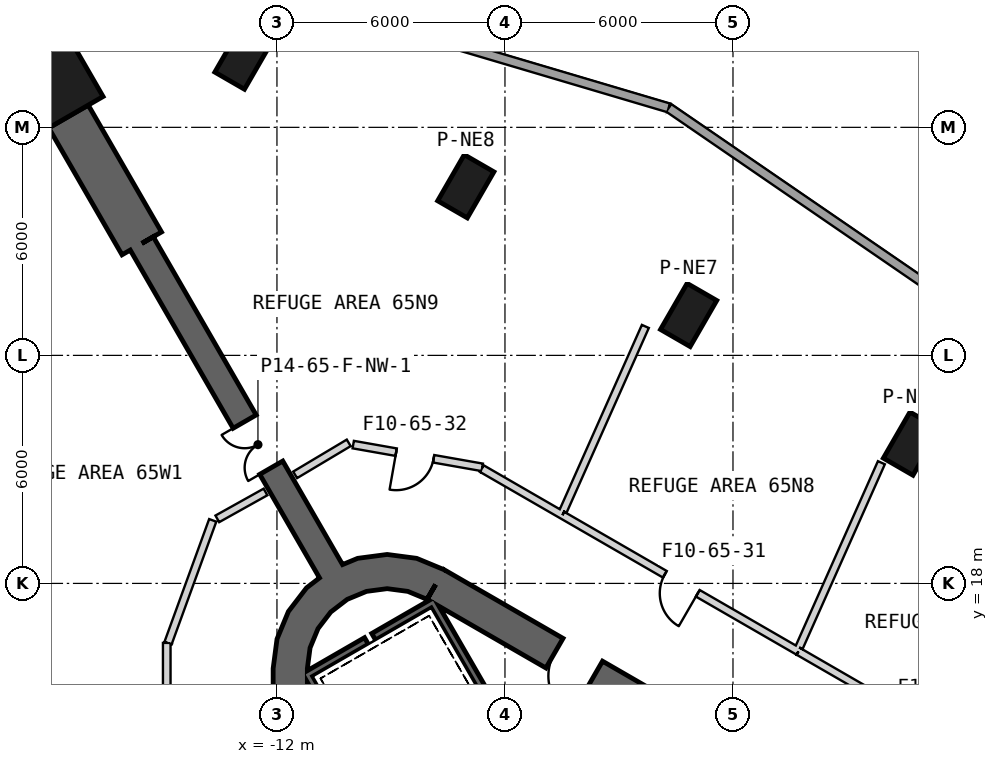
"""IFC4 building model, lengths in metres.
Left out: names, types, materials, properties, quantities, classifications, styles, units other than length and angle.
Written with IfcOpenShell. Run it as: python <this file> out.ifc"""

import sys

from ifc_helpers import new_model, si_unit, direction, frame, frame_2d, origin, origin_2d, place, context, subcontext, project, spatial, polyline, rectangle, outline, extrude, element, fill, save


model = new_model("IFC4")
c1 = context("Model", 3, precision=1e-05, world=origin(), true_north=direction((0.0, 1.0)))
c2 = subcontext(c1, "Body", "Model", "MODEL_VIEW")
j1 = project(units=[si_unit("LENGTHUNIT", "METRE"), si_unit("PLANEANGLEUNIT", "RADIAN")], contexts=[c1])
p1 = place(None, origin())
s1 = spatial("IfcSite", under=j1, at=p1, CompositionType="ELEMENT")
p2 = place(p1, origin())
s2 = spatial("IfcBuilding", under=s1, at=p2, CompositionType="ELEMENT")
p3 = place(p2, frame((0.0, 0.0, 292.7)))
s3 = spatial("IfcBuildingStorey", under=s2, at=p3, CompositionType="ELEMENT", Elevation=292.7)
p4 = place(p3, frame((-18.135, 31.411, 0.0), z_axis=(0.0, 0.0, 1.0), x_axis=(-0.5, 0.866025403784, 0.0)))
e1 = element("IfcColumn", 1, at=p4, inside=s3, PredefinedType="COLUMN", context=c2, shape_type="SweptSolid", body=[
    extrude(rectangle(XDim=2.6, YDim=2.1, at=origin_2d()), origin(), (0.0, 0.0, 1.0), 5.7),
])
for number, where, z_axis, x_axis in (
    (2, (4.697, 21.677, 0.0), (0.0, 0.0, 1.0), (0.5, 0.866, 0.0)),
    (3, (-1.167, 25.063, 0.0), (0.0, 0.0, 1.0), (0.5, 0.866, 0.0)),
    (4, (-7.031, 28.448, 0.0), (0.0, 0.0, 1.0), (0.5, 0.866, 0.0)),
    (5, (-12.895, 31.833, 0.0), (0.0, 0.0, 1.0), (0.5, 0.866, 0.0)),
):
    element("IfcColumn", number, at=place(p3, frame(where, z_axis=z_axis, x_axis=x_axis)), inside=s3, PredefinedType="COLUMN", context=c2, shape_type="SweptSolid", body=[
        extrude(rectangle(XDim=1.4, YDim=0.9, at=origin_2d()), origin(), (0.0, 0.0, 1.0), 5.7),
    ])
p5 = place(p3, frame((19.475, 2.208, 0.0), z_axis=(0.0, 0.0, 1.0), x_axis=(-0.866028369851, 0.499994862586, 0.0)))
e6 = element("IfcWall", 6, at=p5, inside=s3, PredefinedType="SHEAR", context=c2, shape_type="SweptSolid", body=[
    extrude(rectangle(XDim=31.523, YDim=0.9, at=frame_2d((15.762, 0.0))), origin(), (0.0, 0.0, 1.0), 6.0),
])
p6 = place(p5, frame((3.612, 0.0, 0.0)))
e7 = element("IfcOpeningElement", 7, at=p6, cuts=e6, PredefinedType="OPENING", context=c2, shape_type="SweptSolid", body=[
    extrude(rectangle(XDim=1.2, YDim=2.4, at=frame_2d((0.6, 1.2))), frame((0.0, 0.46, 0.0), z_axis=(0.0, -1.0, 0.0), x_axis=(1.0, 0.0, 0.0)), (0.0, 0.0, 1.0), 0.92),
])
p7 = place(p5, frame((26.712, 0.0, 0.0)))
e8 = element("IfcOpeningElement", 8, at=p7, cuts=e6, PredefinedType="OPENING", context=c2, shape_type="SweptSolid", body=[
    extrude(rectangle(XDim=1.2, YDim=2.4, at=frame_2d((0.6, 1.2))), frame((0.0, 0.46, 0.0), z_axis=(0.0, -1.0, 0.0), x_axis=(1.0, 0.0, 0.0)), (0.0, 0.0, 1.0), 0.92),
])
p8 = place(p3, frame((-11.65, 15.762, 0.0), z_axis=(0.0, 0.0, 1.0), x_axis=(0.0, -1.0, 0.0)))
e9 = element("IfcWall", 9, at=p8, inside=s3, PredefinedType="SHEAR", context=c2, shape_type="SweptSolid", body=[
    extrude(rectangle(XDim=31.523, YDim=0.9, at=frame_2d((15.762, 0.0))), origin(), (0.0, 0.0, 1.0), 6.0),
])
p9 = place(p8, frame((3.612, 0.0, 0.0)))
e10 = element("IfcOpeningElement", 10, at=p9, cuts=e9, PredefinedType="OPENING", context=c2, shape_type="SweptSolid", body=[
    extrude(rectangle(XDim=1.2, YDim=2.4, at=frame_2d((0.6, 1.2))), frame((0.0, 0.46, 0.0), z_axis=(0.0, -1.0, 0.0), x_axis=(1.0, 0.0, 0.0)), (0.0, 0.0, 1.0), 0.92),
])
p10 = place(p8, frame((26.712, 0.0, 0.0)))
e11 = element("IfcOpeningElement", 11, at=p10, cuts=e9, PredefinedType="OPENING", context=c2, shape_type="SweptSolid", body=[
    extrude(rectangle(XDim=1.2, YDim=2.4, at=frame_2d((0.6, 1.2))), frame((0.0, 0.46, 0.0), z_axis=(0.0, -1.0, 0.0), x_axis=(1.0, 0.0, 0.0)), (0.0, 0.0, 1.0), 0.92),
])
p11 = place(p3, origin())
e12 = element("IfcWall", 12, at=p11, inside=s3, PredefinedType="SHEAR", context=c2, shape_type="SweptSolid", body=[
    extrude(outline(polyline([(-7.6, 18.36), (-8.323, 18.659), (-9.1, 18.762), (-9.876, 18.659), (-10.6, 18.36), (-11.221, 17.883), (-11.698, 17.262), (-11.998, 16.538), (-12.1, 15.762), (-11.2, 15.762), (-11.128, 16.305), (-10.919, 16.812), (-10.585, 17.247), (-10.15, 17.58), (-9.644, 17.79), (-9.1, 17.862), (-8.556, 17.79), (-8.05, 17.58), (-7.6, 18.36)])), origin(), (0.0, 0.0, 1.0), 6.0),
])
p12 = place(p3, frame((-10.575, 18.316, 0.0), z_axis=(0.0, 0.0, 1.0), x_axis=(-0.500007350791, 0.866021159762, 0.0)))
e13 = element("IfcWall", 13, at=p12, inside=s3, PredefinedType="SHEAR", context=c2, shape_type="SweptSolid", body=[
    extrude(rectangle(XDim=9.965, YDim=0.7, at=frame_2d((4.982, 0.0))), origin(), (0.0, 0.0, 1.0), 6.0),
])
p13 = place(p12, frame((3.15, 0.0, 0.0)))
e14 = element("IfcOpeningElement", 14, at=p13, cuts=e13, PredefinedType="OPENING", context=c2, shape_type="SweptSolid", body=[
    extrude(rectangle(XDim=1.4, YDim=2.4, at=frame_2d((0.7, 1.2))), frame((0.0, 0.36, 0.0), z_axis=(0.0, -1.0, 0.0), x_axis=(1.0, 0.0, 0.0)), (0.0, 0.0, 1.0), 0.72),
])
p14 = place(p3, frame((-15.557, 26.946, -0.35), z_axis=(0.0, 0.0, 1.0), x_axis=(-0.499980071345, 0.866036909293, 0.0)))
e15 = element("IfcWall", 15, at=p14, inside=s3, PredefinedType="SHEAR", context=c2, shape_type="SweptSolid", body=[
    extrude(rectangle(XDim=3.856, YDim=1.2, at=frame_2d((1.928, 0.0))), origin(), (0.0, 0.0, 1.0), 6.35),
])
p15 = place(p3, frame((25.971, 11.532, 0.0), z_axis=(0.0, 0.0, 1.0), x_axis=(-0.824555025779, 0.565781768408, 0.0)))
e16 = element("IfcWall", 16, at=p15, inside=s3, PredefinedType="SOLIDWALL", context=c2, shape_type="SweptSolid", body=[
    extrude(rectangle(XDim=33.547, YDim=0.24, at=frame_2d((16.774, 0.0))), origin(), (0.0, 0.0, 1.0), 5.7),
])
p16 = place(p3, frame((-1.691, 30.513, 0.0), z_axis=(0.0, 0.0, 1.0), x_axis=(-0.9588488603, 0.283917000373, 0.0)))
e17 = element("IfcWall", 17, at=p16, inside=s3, PredefinedType="SOLIDWALL", context=c2, shape_type="SweptSolid", body=[
    extrude(rectangle(XDim=11.45, YDim=0.24, at=frame_2d((5.725, 0.0))), origin(), (0.0, 0.0, 1.0), 5.7),
])
p17 = place(p3, frame((-16.099, 34.682, 0.0), z_axis=(0.0, 0.0, 1.0), x_axis=(-0.866022320763, -0.500005339912, 0.0)))
e18 = element("IfcWall", 18, at=p17, inside=s3, PredefinedType="SOLIDWALL", context=c2, shape_type="SweptSolid", body=[
    extrude(rectangle(XDim=6.798, YDim=0.24, at=frame_2d((3.399, 0.0))), origin(), (0.0, 0.0, 1.0), 5.7),
])
p18 = place(p3, frame((-11.245, 15.678, -0.35), z_axis=(0.0, 0.0, 1.0), x_axis=(0.499977274689, -0.866038523851, 0.0)))
e19 = element("IfcWall", 19, at=p18, inside=s3, PredefinedType="SHEAR", context=c2, shape_type="SweptSolid", body=[
    extrude(rectangle(XDim=8.1, YDim=0.2, at=frame_2d((4.05, 0.0))), origin(), (0.0, 0.0, 1.0), 6.05),
])
p19 = place(p3, frame((-7.818, 17.541, -0.35), z_axis=(0.0, 0.0, 1.0), x_axis=(-0.866088799389, -0.499890179513, 0.0)))
e20 = element("IfcWall", 20, at=p19, inside=s3, PredefinedType="SHEAR", context=c2, shape_type="SweptSolid", body=[
    extrude(rectangle(XDim=1.89, YDim=0.2, at=frame_2d((0.945, 0.0))), origin(), (0.0, 0.0, 1.0), 6.05),
])
p20 = place(p3, frame((-9.645, 16.486, -0.35), z_axis=(0.0, 0.0, 1.0), x_axis=(-0.866038843867, -0.499976720371, 0.0)))
e21 = element("IfcWall", 21, at=p20, inside=s3, PredefinedType="SHEAR", context=c2, shape_type="SweptSolid", body=[
    extrude(rectangle(XDim=1.69, YDim=0.2, at=frame_2d((0.845, 0.0))), origin(), (0.0, 0.0, 1.0), 6.05),
])
p21 = place(p3, frame((-7.854, 17.405, -0.35), z_axis=(0.0, 0.0, 1.0), x_axis=(0.499997992926, -0.866026562566, 0.0)))
e22 = element("IfcWall", 22, at=p21, inside=s3, PredefinedType="SHEAR", context=c2, shape_type="SweptSolid", body=[
    extrude(rectangle(XDim=7.9, YDim=0.2, at=frame_2d((3.95, 0.0))), origin(), (0.0, 0.0, 1.0), 6.05),
])
p22 = place(p3, frame((-14.9, 16.435, 0.0), z_axis=(0.0, 0.0, 1.0), x_axis=(0.0, -1.0, 0.0)))
e23 = element("IfcWall", 23, at=p22, inside=s3, PredefinedType="PARTITIONING", context=c2, shape_type="SweptSolid", body=[
    extrude(rectangle(XDim=32.87, YDim=0.2, at=frame_2d((16.435, 0.0))), origin(), (0.0, 0.0, 1.0), 4.98),
])
p23 = place(p22, frame((1.5, 0.0, 0.0)))
e24 = element("IfcOpeningElement", 24, at=p23, cuts=e23, PredefinedType="OPENING", context=c2, shape_type="SweptSolid", body=[
    extrude(rectangle(XDim=1.0, YDim=2.1, at=frame_2d((0.5, 1.05))), frame((0.0, 0.11, 0.0), z_axis=(0.0, -1.0, 0.0), x_axis=(1.0, 0.0, 0.0)), (0.0, 0.0, 1.0), 0.22),
])
p24 = place(p22, frame((7.506, 0.0, 0.0)))
e25 = element("IfcOpeningElement", 25, at=p24, cuts=e23, PredefinedType="OPENING", context=c2, shape_type="SweptSolid", body=[
    extrude(rectangle(XDim=1.0, YDim=2.1, at=frame_2d((0.5, 1.05))), frame((0.0, 0.11, 0.0), z_axis=(0.0, -1.0, 0.0), x_axis=(1.0, 0.0, 0.0)), (0.0, 0.0, 1.0), 0.22),
])
p25 = place(p22, frame((15.787, 0.0, 0.0)))
e26 = element("IfcOpeningElement", 26, at=p25, cuts=e23, PredefinedType="OPENING", context=c2, shape_type="SweptSolid", body=[
    extrude(rectangle(XDim=1.0, YDim=2.1, at=frame_2d((0.5, 1.05))), frame((0.0, 0.11, 0.0), z_axis=(0.0, -1.0, 0.0), x_axis=(1.0, 0.0, 0.0)), (0.0, 0.0, 1.0), 0.22),
])
p26 = place(p22, frame((24.068, 0.0, 0.0)))
e27 = element("IfcOpeningElement", 27, at=p26, cuts=e23, PredefinedType="OPENING", context=c2, shape_type="SweptSolid", body=[
    extrude(rectangle(XDim=1.0, YDim=2.1, at=frame_2d((0.5, 1.05))), frame((0.0, 0.11, 0.0), z_axis=(0.0, -1.0, 0.0), x_axis=(1.0, 0.0, 0.0)), (0.0, 0.0, 1.0), 0.22),
])
p27 = place(p22, frame((30.35, 0.0, 0.0)))
e28 = element("IfcOpeningElement", 28, at=p27, cuts=e23, PredefinedType="OPENING", context=c2, shape_type="SweptSolid", body=[
    extrude(rectangle(XDim=1.0, YDim=2.1, at=frame_2d((0.5, 1.05))), frame((0.0, 0.11, 0.0), z_axis=(0.0, -1.0, 0.0), x_axis=(1.0, 0.0, 0.0)), (0.0, 0.0, 1.0), 0.22),
])
p28 = place(p3, frame((-13.69, 19.659, 0.0), z_axis=(0.0, 0.0, 1.0), x_axis=(-0.341976858915, -0.939708373894, 0.0)))
e29 = element("IfcWall", 29, at=p28, inside=s3, PredefinedType="PARTITIONING", context=c2, shape_type="SweptSolid", body=[
    extrude(rectangle(XDim=3.438, YDim=0.2, at=frame_2d((1.719, 0.0))), origin(), (0.0, 0.0, 1.0), 4.88),
])
p29 = place(p3, frame((-12.301, 20.406, 0.0), z_axis=(0.0, 0.0, 1.0), x_axis=(-0.873235961829, -0.487297604108, 0.0)))
e30 = element("IfcWall", 30, at=p29, inside=s3, PredefinedType="PARTITIONING", context=c2, shape_type="SweptSolid", body=[
    extrude(rectangle(XDim=1.452, YDim=0.2, at=frame_2d((0.726, 0.0))), origin(), (0.0, 0.0, 1.0), 5.7),
])
p30 = place(p3, frame((7.933, 12.625, 0.0), z_axis=(0.0, 0.0, 1.0), x_axis=(-0.866022320763, 0.500005339912, 0.0)))
e31 = element("IfcWall", 31, at=p30, inside=s3, PredefinedType="PARTITIONING", context=c2, shape_type="SweptSolid", body=[
    extrude(rectangle(XDim=7.172, YDim=0.2, at=frame_2d((3.586, 0.0))), origin(), (0.0, 0.0, 1.0), 5.07),
])
p31 = place(p30, frame((3.059, 0.0, 0.0)))
e32 = element("IfcOpeningElement", 32, at=p31, cuts=e31, PredefinedType="OPENING", context=c2, shape_type="SweptSolid", body=[
    extrude(rectangle(XDim=1.0, YDim=2.1, at=frame_2d((0.5, 1.05))), frame((0.0, 0.11, 0.0), z_axis=(0.0, -1.0, 0.0), x_axis=(1.0, 0.0, 0.0)), (0.0, 0.0, 1.0), 0.22),
])
p32 = place(p3, frame((1.722, 16.211, 0.0), z_axis=(0.0, 0.0, 1.0), x_axis=(-0.866030831008, 0.499990599656, 0.0)))
e33 = element("IfcWall", 33, at=p32, inside=s3, PredefinedType="PARTITIONING", context=c2, shape_type="SweptSolid", body=[
    extrude(rectangle(XDim=7.172, YDim=0.2, at=frame_2d((3.586, 0.0))), origin(), (0.0, 0.0, 1.0), 5.07),
])
p33 = place(p32, frame((3.059, 0.0, 0.0)))
e34 = element("IfcOpeningElement", 34, at=p33, cuts=e33, PredefinedType="OPENING", context=c2, shape_type="SweptSolid", body=[
    extrude(rectangle(XDim=1.0, YDim=2.1, at=frame_2d((0.5, 1.05))), frame((0.0, 0.11, 0.0), z_axis=(0.0, -1.0, 0.0), x_axis=(1.0, 0.0, 0.0)), (0.0, 0.0, 1.0), 0.22),
])
p34 = place(p3, frame((-4.489, 19.797, 0.0), z_axis=(0.0, 0.0, 1.0), x_axis=(-0.8660013066, 0.500041735226, 0.0)))
e35 = element("IfcWall", 35, at=p34, inside=s3, PredefinedType="PARTITIONING", context=c2, shape_type="SweptSolid", body=[
    extrude(rectangle(XDim=2.449, YDim=0.2, at=frame_2d((1.225, 0.0))), origin(), (0.0, 0.0, 1.0), 4.98),
])
p35 = place(p3, frame((-10.111, 21.698, 0.0), z_axis=(0.0, 0.0, 1.0), x_axis=(-0.858684097611, -0.512505239495, 0.0)))
e36 = element("IfcWall", 36, at=p35, inside=s3, PredefinedType="PARTITIONING", context=c2, shape_type="SweptSolid", body=[
    extrude(rectangle(XDim=1.643, YDim=0.2, at=frame_2d((0.821, 0.0))), origin(), (0.0, 0.0, 1.0), 5.7),
])
p36 = place(p3, frame((-6.598, 21.054, 0.0), z_axis=(0.0, 0.0, 1.0), x_axis=(-0.984805653599, 0.173660083612, 0.0)))
e37 = element("IfcWall", 37, at=p36, inside=s3, PredefinedType="PARTITIONING", context=c2, shape_type="SweptSolid", body=[
    extrude(rectangle(XDim=3.447, YDim=0.2, at=frame_2d((1.724, 0.0))), origin(), (0.0, 0.0, 1.0), 5.7),
])
p37 = place(p36, frame((1.3, 0.0, 0.0)))
e38 = element("IfcOpeningElement", 38, at=p37, cuts=e37, PredefinedType="OPENING", context=c2, shape_type="SweptSolid", body=[
    extrude(rectangle(XDim=1.0, YDim=2.1, at=frame_2d((0.5, 1.05))), frame((0.0, 0.11, 0.0), z_axis=(0.0, -1.0, 0.0), x_axis=(1.0, 0.0, 0.0)), (0.0, 0.0, 1.0), 0.22),
])
p38 = place(p3, frame((1.741, 16.315, 0.0), z_axis=(0.0, 0.0, 1.0), x_axis=(0.406734425958, 0.913546444764, 0.0)))
e39 = element("IfcWall", 39, at=p38, inside=s3, PredefinedType="PARTITIONING", context=c2, shape_type="SweptSolid", body=[
    extrude(rectangle(XDim=5.321, YDim=0.2, at=frame_2d((2.66, 0.0))), origin(), (0.0, 0.0, 1.0), 5.7),
])
p39 = place(p3, frame((-4.47, 19.901, 0.0), z_axis=(0.0, 0.0, 1.0), x_axis=(0.406751476537, 0.913538853216, 0.0)))
e40 = element("IfcWall", 40, at=p39, inside=s3, PredefinedType="PARTITIONING", context=c2, shape_type="SweptSolid", body=[
    extrude(rectangle(XDim=5.32, YDim=0.2, at=frame_2d((2.66, 0.0))), origin(), (0.0, 0.0, 1.0), 5.7),
])
p40 = place(p33, origin())
e41 = element("IfcDoor", 41, at=p40, inside=s3, OperationType="SINGLE_SWING_LEFT", PredefinedType="USERDEFINED", context=c2, shape_type="SweptSolid", body=[
    extrude(rectangle(XDim=1.0, YDim=2.1, at=frame_2d((0.5, 1.05))), frame((0.0, 0.025, 0.0), z_axis=(0.0, -1.0, 0.0), x_axis=(1.0, 0.0, 0.0)), (0.0, 0.0, 1.0), 0.05),
])
fill(e34, e41)
p41 = place(p37, origin())
e42 = element("IfcDoor", 42, at=p41, inside=s3, OperationType="SINGLE_SWING_RIGHT", PredefinedType="USERDEFINED", context=c2, shape_type="SweptSolid", body=[
    extrude(rectangle(XDim=1.0, YDim=2.1, at=frame_2d((0.5, 1.05))), frame((0.0, 0.025, 0.0), z_axis=(0.0, -1.0, 0.0), x_axis=(1.0, 0.0, 0.0)), (0.0, 0.0, 1.0), 0.05),
])
fill(e38, e42)
p42 = place(p7, origin())
e43 = element("IfcDoor", 43, at=p42, inside=s3, OperationType="SINGLE_SWING_LEFT", PredefinedType="USERDEFINED", context=c2, shape_type="SweptSolid", body=[
    extrude(rectangle(XDim=1.2, YDim=2.4, at=frame_2d((0.6, 1.2))), frame((0.0, 0.025, 0.0), z_axis=(0.0, -1.0, 0.0), x_axis=(1.0, 0.0, 0.0)), (0.0, 0.0, 1.0), 0.05),
])
fill(e8, e43)
p43 = place(p13, origin())
e44 = element("IfcDoor", 44, at=p43, inside=s3, OperationType="DOUBLE_DOOR_SINGLE_SWING", PredefinedType="NOTDEFINED", context=c2, shape_type="SweptSolid", body=[
    extrude(rectangle(XDim=1.4, YDim=2.4, at=frame_2d((0.7, 1.2))), frame((0.0, 0.025, 0.0), z_axis=(0.0, -1.0, 0.0), x_axis=(1.0, 0.0, 0.0)), (0.0, 0.0, 1.0), 0.05),
])
fill(e14, e44)
save(model, sys.argv[1])
